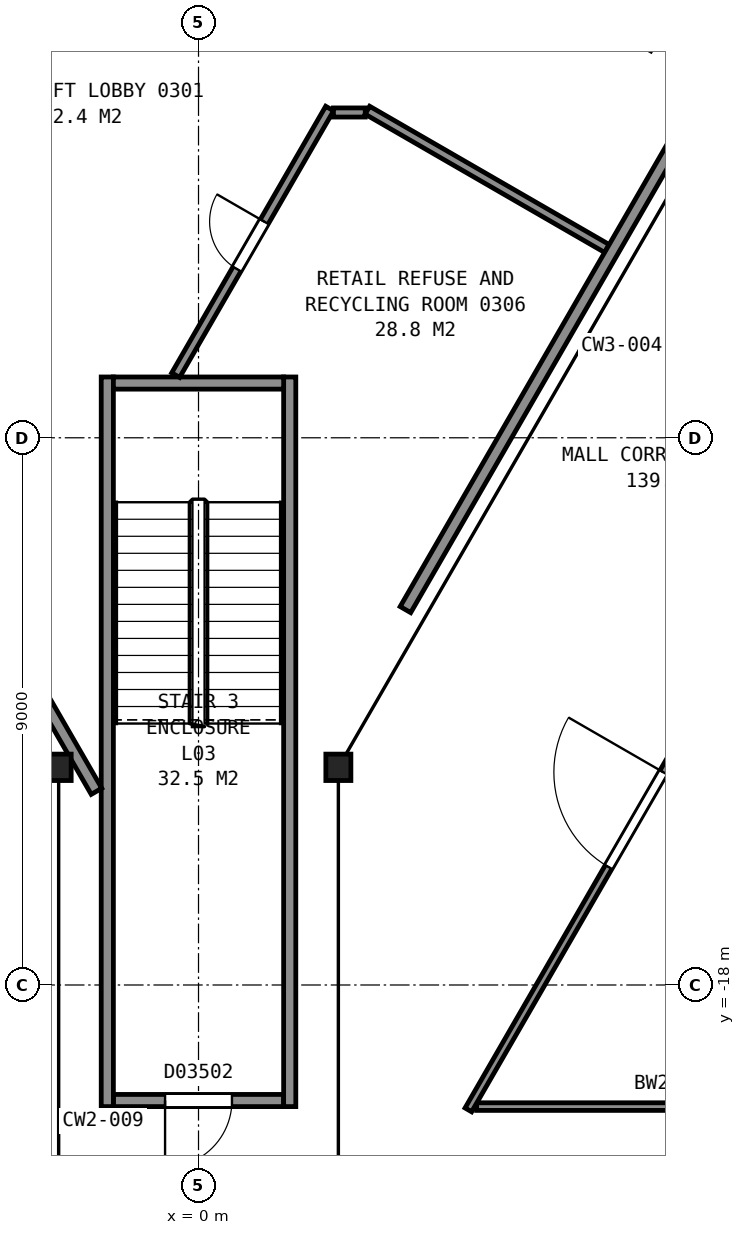
"""IFC4 building model, lengths in metres.
Left out: names, types, materials, properties, quantities, classifications, styles, units other than length and angle.
Written with IfcOpenShell. Run it as: python <this file> out.ifc"""

import sys

from ifc_helpers import new_model, si_unit, direction, frame, frame_2d, origin, origin_2d, place, context, subcontext, project, spatial, rectangle, i_section, extrude, element, fill, save


model = new_model("IFC4")
c1 = context("Model", 3, precision=1e-05, world=origin(), true_north=direction((0.0, 1.0)))
c2 = subcontext(c1, "Body", "Model", "MODEL_VIEW")
j1 = project(units=[si_unit("LENGTHUNIT", "METRE"), si_unit("PLANEANGLEUNIT", "RADIAN")], contexts=[c1])
p1 = place(None, origin())
s1 = spatial("IfcSite", under=j1, at=p1, CompositionType="ELEMENT")
p2 = place(p1, origin())
s2 = spatial("IfcBuilding", under=s1, at=p2, CompositionType="ELEMENT")
p3 = place(p2, frame((0.0, 0.0, 22.4)))
s3 = spatial("IfcBuildingStorey", under=s2, at=p3, CompositionType="ELEMENT", Elevation=22.4)
for number, where, z_axis, x_axis in (
    (1, (-2.3, -14.42, 0.0), (0.0, 0.0, 1.0), (1.0, 0.0, 0.0)),
    (2, (2.3, -14.42, 0.0), (0.0, 0.0, 1.0), (1.0, 0.0, 0.0)),
):
    element("IfcColumn", number, at=place(p3, frame(where, z_axis=z_axis, x_axis=x_axis)), inside=s3, PredefinedType="COLUMN", context=c2, shape_type="SweptSolid", body=[
        extrude(i_section(OverallWidth=0.411, OverallDepth=0.434, WebThickness=0.036, FlangeThickness=0.057, FilletRadius=0.015, at=origin_2d()), origin(), (0.0, 0.0, 1.0), 4.8),
    ])
p4 = place(p3, frame((-1.4, -19.9, 0.0), z_axis=(0.0, 0.0, 1.0), x_axis=(1.0, 0.0, 0.0)))
e3 = element("IfcWall", 3, at=p4, inside=s3, PredefinedType="PARTITIONING", context=c2, shape_type="SweptSolid", body=[
    extrude(rectangle(XDim=2.8, YDim=0.2, at=frame_2d((1.4, 0.0))), origin(), (0.0, 0.0, 1.0), 4.55),
])
p5 = place(p4, frame((0.85, 0.0, 0.0)))
e4 = element("IfcOpeningElement", 4, at=p5, cuts=e3, PredefinedType="OPENING", context=c2, shape_type="SweptSolid", body=[
    extrude(rectangle(XDim=1.1, YDim=2.1, at=frame_2d((0.55, 1.05))), frame((0.0, 0.11, 0.0), z_axis=(0.0, -1.0, 0.0), x_axis=(1.0, 0.0, 0.0)), (0.0, 0.0, 1.0), 0.22),
])
for number, where, z_axis, x_axis in (
    (5, (1.5, -8.0, 0.0), (0.0, 0.0, 1.0), (0.0, -1.0, 0.0)),
    (6, (-1.5, -8.0, 0.0), (0.0, 0.0, 1.0), (0.0, -1.0, 0.0)),
):
    element("IfcWall", number, at=place(p3, frame(where, z_axis=z_axis, x_axis=x_axis)), inside=s3, PredefinedType="PARTITIONING", context=c2, shape_type="SweptSolid", body=[
        extrude(rectangle(XDim=12.0, YDim=0.2, at=frame_2d((6.0, 0.0))), origin(), (0.0, 0.0, 1.0), 4.55),
    ])
p6 = place(p3, frame((-1.4, -8.1, 0.0), z_axis=(0.0, 0.0, 1.0), x_axis=(1.0, 0.0, 0.0)))
e7 = element("IfcWall", 7, at=p6, inside=s3, PredefinedType="PARTITIONING", context=c2, shape_type="SweptSolid", body=[
    extrude(rectangle(XDim=2.8, YDim=0.2, at=frame_2d((1.4, 0.0))), origin(), (0.0, 0.0, 1.0), 4.55),
])
p7 = place(p3, frame((-4.914, -9.208, 0.0), z_axis=(0.0, 0.0, 1.0), x_axis=(0.499947703927, -0.866055594831, 0.0)))
e8 = element("IfcWall", 8, at=p7, inside=s3, PredefinedType="PARTITIONING", context=c2, shape_type="SweptSolid", body=[
    extrude(rectangle(XDim=6.474, YDim=0.2, at=frame_2d((3.237, 0.0))), origin(), (0.0, 0.0, 1.0), 4.55),
])
p8 = place(p3, frame((2.156, -3.585, 0.0), z_axis=(0.0, 0.0, 1.0), x_axis=(-0.500064700545, -0.865988045685, 0.0)))
e9 = element("IfcWall", 9, at=p8, inside=s3, PredefinedType="PARTITIONING", context=c2, shape_type="SweptSolid", body=[
    extrude(rectangle(XDim=5.063, YDim=0.15, at=frame_2d((2.532, 0.0))), origin(), (0.0, 0.0, 1.0), 4.55),
])
p9 = place(p8, frame((2.148, 0.0, 0.0)))
e10 = element("IfcOpeningElement", 10, at=p9, cuts=e9, PredefinedType="OPENING", context=c2, shape_type="SweptSolid", body=[
    extrude(rectangle(XDim=0.9, YDim=2.1, at=frame_2d((0.45, 1.05))), frame((0.0, 0.085, 0.0), z_axis=(0.0, -1.0, 0.0), x_axis=(1.0, 0.0, 0.0)), (0.0, 0.0, 1.0), 0.17),
])
p10 = place(p3, frame((2.219, -3.65, 0.0), z_axis=(0.0, 0.0, 1.0), x_axis=(1.0, 0.0, 0.0)))
e11 = element("IfcWall", 11, at=p10, inside=s3, PredefinedType="PARTITIONING", context=c2, shape_type="SweptSolid", body=[
    extrude(rectangle(XDim=0.523, YDim=0.15, at=frame_2d((0.261, 0.0))), origin(), (0.0, 0.0, 1.0), 4.55),
])
p11 = place(p3, frame((2.777, -3.613, 0.0), z_axis=(0.0, 0.0, 1.0), x_axis=(0.866014865915, -0.500018251681, 0.0)))
e12 = element("IfcWall", 12, at=p11, inside=s3, PredefinedType="PARTITIONING", context=c2, shape_type="SweptSolid", body=[
    extrude(rectangle(XDim=4.549, YDim=0.15, at=frame_2d((2.274, 0.0))), origin(), (0.0, 0.0, 1.0), 4.55),
])
p12 = place(p3, frame((3.403, -11.826, 0.0), z_axis=(0.0, 0.0, 1.0), x_axis=(0.499990831429, 0.866030697196, 0.0)))
e13 = element("IfcWall", 13, at=p12, inside=s3, PredefinedType="PARTITIONING", context=c2, shape_type="SweptSolid", body=[
    extrude(rectangle(XDim=20.526, YDim=0.2, at=frame_2d((10.263, 0.0))), origin(), (0.0, 0.0, 1.0), 4.55),
])
p13 = place(p12, frame((10.0, 0.0, 0.0)))
e14 = element("IfcOpeningElement", 14, at=p13, cuts=e13, PredefinedType="OPENING", context=c2, shape_type="SweptSolid", body=[
    extrude(rectangle(XDim=1.8, YDim=2.1, at=frame_2d((0.9, 1.05))), frame((0.0, 0.11, 0.0), z_axis=(0.0, -1.0, 0.0), x_axis=(1.0, 0.0, 0.0)), (0.0, 0.0, 1.0), 0.22),
])
p14 = place(p3, frame((4.574, -20.0, 0.0), z_axis=(0.0, 0.0, 1.0), x_axis=(1.0, 0.0, 0.0)))
e15 = element("IfcWall", 15, at=p14, inside=s3, PredefinedType="PARTITIONING", context=c2, shape_type="SweptSolid", body=[
    extrude(rectangle(XDim=7.285, YDim=0.125, at=frame_2d((3.643, 0.0))), origin(), (0.0, 0.0, 1.0), 4.64),
])
p15 = place(p3, frame((19.586, 6.184, 0.0), z_axis=(0.0, 0.0, 1.0), x_axis=(-0.499994028088, -0.866028851642, 0.0)))
e16 = element("IfcWall", 16, at=p15, inside=s3, PredefinedType="PARTITIONING", context=c2, shape_type="SweptSolid", body=[
    extrude(rectangle(XDim=30.297, YDim=0.125, at=frame_2d((15.148, 0.0))), origin(), (0.0, 0.0, 1.0), 3.653),
])
p16 = place(p15, frame((23.885, 0.0, 0.0)))
e17 = element("IfcOpeningElement", 17, at=p16, cuts=e16, PredefinedType="OPENING", context=c2, shape_type="SweptSolid", body=[
    extrude(rectangle(XDim=1.8, YDim=2.4, at=frame_2d((0.9, 1.2))), frame((0.0, 0.073, 0.0), z_axis=(0.0, -1.0, 0.0), x_axis=(1.0, 0.0, 0.0)), (0.0, 0.0, 1.0), 0.145),
])
p17 = place(p15, frame((16.741, 0.0, 0.0)))
e18 = element("IfcOpeningElement", 18, at=p17, cuts=e16, PredefinedType="OPENING", context=c2, shape_type="SweptSolid", body=[
    extrude(rectangle(XDim=1.0, YDim=2.1, at=frame_2d((0.5, 1.05))), frame((0.0, 0.073, 0.0), z_axis=(0.0, -1.0, 0.0), x_axis=(1.0, 0.0, 0.0)), (0.0, 0.0, 1.0), 0.145),
])
p18 = place(p15, frame((10.349, 0.0, 0.0)))
e19 = element("IfcOpeningElement", 19, at=p18, cuts=e16, PredefinedType="OPENING", context=c2, shape_type="SweptSolid", body=[
    extrude(rectangle(XDim=1.2, YDim=2.1, at=frame_2d((0.6, 1.05))), frame((0.0, 0.073, 0.0), z_axis=(0.0, -1.0, 0.0), x_axis=(1.0, 0.0, 0.0)), (0.0, 0.0, 1.0), 0.145),
])
p19 = place(p15, frame((2.817, 0.0, 0.0)))
e20 = element("IfcOpeningElement", 20, at=p19, cuts=e16, PredefinedType="OPENING", context=c2, shape_type="SweptSolid", body=[
    extrude(rectangle(XDim=1.2, YDim=2.1, at=frame_2d((0.6, 1.05))), frame((0.0, 0.073, 0.0), z_axis=(0.0, -1.0, 0.0), x_axis=(1.0, 0.0, 0.0)), (0.0, 0.0, 1.0), 0.145),
])
p20 = place(p5, origin())
e21 = element("IfcDoor", 21, at=p20, inside=s3, OperationType="SINGLE_SWING_LEFT", PredefinedType="DOOR", context=c2, shape_type="SweptSolid", body=[
    extrude(rectangle(XDim=1.1, YDim=2.1, at=frame_2d((0.55, 1.05))), frame((0.0, 0.025, 0.0), z_axis=(0.0, -1.0, 0.0), x_axis=(1.0, 0.0, 0.0)), (0.0, 0.0, 1.0), 0.05),
])
fill(e4, e21)
p21 = place(p9, origin())
e22 = element("IfcDoor", 22, at=p21, inside=s3, OperationType="SINGLE_SWING_LEFT", PredefinedType="DOOR", context=c2, shape_type="SweptSolid", body=[
    extrude(rectangle(XDim=0.9, YDim=2.1, at=frame_2d((0.45, 1.05))), frame((0.0, 0.025, 0.0), z_axis=(0.0, -1.0, 0.0), x_axis=(1.0, 0.0, 0.0)), (0.0, 0.0, 1.0), 0.05),
])
fill(e10, e22)
p22 = place(p16, origin())
e23 = element("IfcDoor", 23, at=p22, inside=s3, OperationType="DOUBLE_DOOR_SINGLE_SWING", PredefinedType="DOOR", context=c2, shape_type="SweptSolid", body=[
    extrude(rectangle(XDim=1.8, YDim=2.4, at=frame_2d((0.9, 1.2))), frame((0.0, 0.025, 0.0), z_axis=(0.0, -1.0, 0.0), x_axis=(1.0, 0.0, 0.0)), (0.0, 0.0, 1.0), 0.05),
])
fill(e17, e23)
save(model, sys.argv[1])
